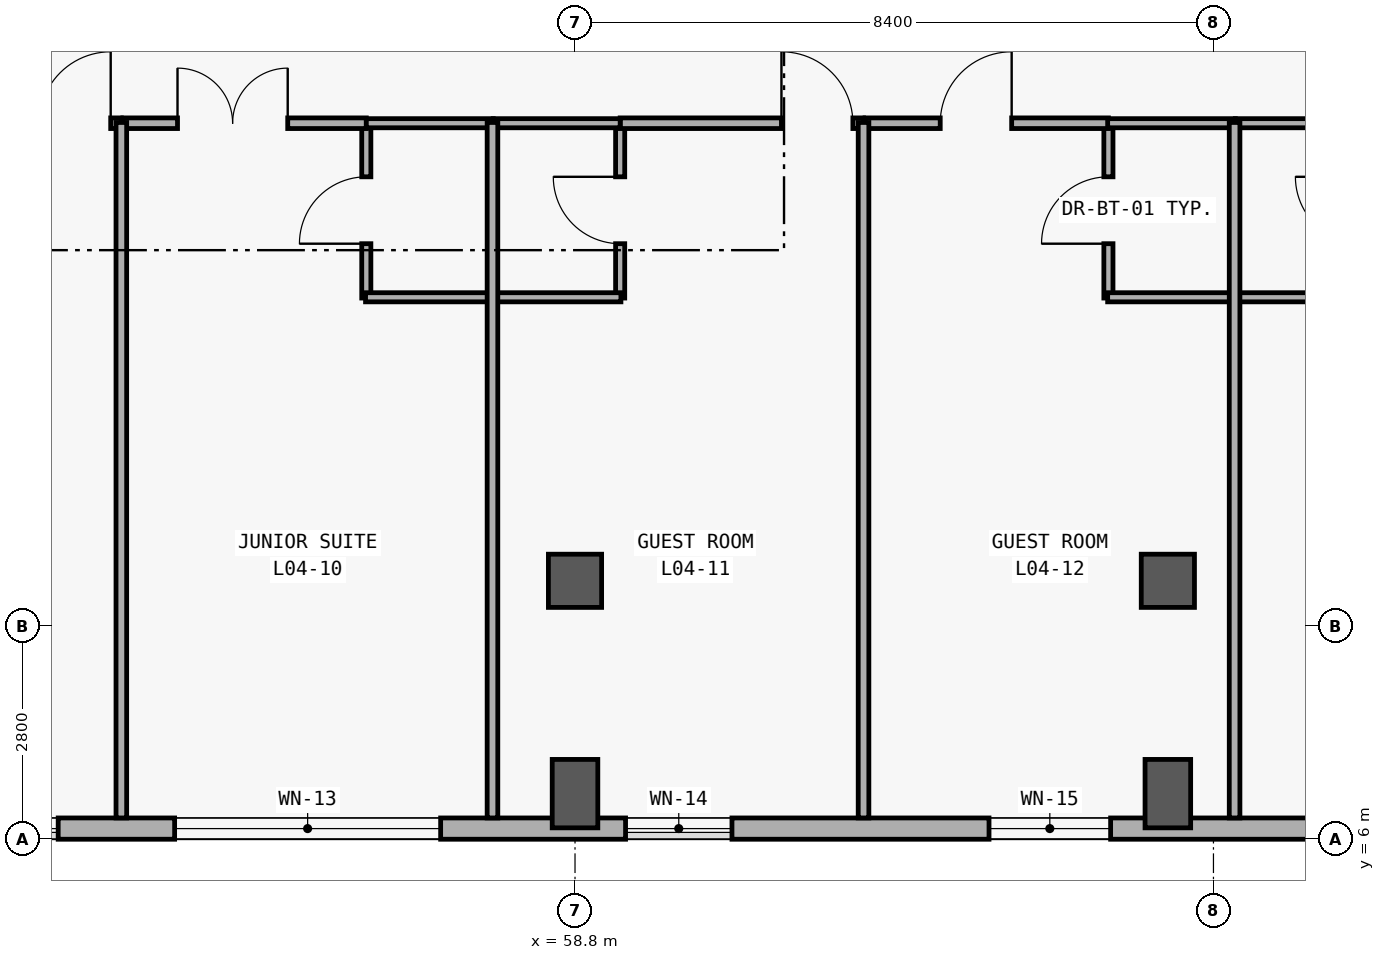
"""IFC4 building model, lengths in metres.
Left out: names, types, materials, properties, quantities, classifications, styles, units other than length and angle.
Written with IfcOpenShell. Run it as: python <this file> out.ifc"""

import sys

from ifc_helpers import new_model, si_unit, direction, frame, frame_2d, origin, origin_2d, place, context, subcontext, project, spatial, rectangle, extrude, element, fill, save


model = new_model("IFC4")
c1 = context("Model", 3, precision=1e-05, world=origin(), true_north=direction((0.0, 1.0)))
c2 = subcontext(c1, "Body", "Model", "MODEL_VIEW")
j1 = project(units=[si_unit("LENGTHUNIT", "METRE"), si_unit("PLANEANGLEUNIT", "RADIAN")], contexts=[c1])
p1 = place(None, origin())
s1 = spatial("IfcSite", under=j1, at=p1, CompositionType="ELEMENT")
p2 = place(p1, origin())
s2 = spatial("IfcBuilding", under=s1, at=p2, CompositionType="ELEMENT")
p3 = place(p2, frame((0.0, 0.0, 19.2)))
s3 = spatial("IfcBuildingStorey", under=s2, at=p3, CompositionType="ELEMENT", Elevation=19.2)
p4 = place(p3, frame((58.8, 6.6, 0.0), z_axis=(0.0, 0.0, 1.0), x_axis=(0.0, 1.0, 0.0)))
e1 = element("IfcColumn", 1, at=p4, inside=s3, PredefinedType="COLUMN", context=c2, shape_type="SweptSolid", body=[
    extrude(rectangle(XDim=0.6, YDim=0.9, at=origin_2d()), origin(), (0.0, 0.0, 1.0), 3.6),
])
p5 = place(p3, frame((58.8, 9.4, 0.0), z_axis=(0.0, 0.0, 1.0), x_axis=(1.0, 0.0, 0.0)))
e2 = element("IfcColumn", 2, at=p5, inside=s3, PredefinedType="COLUMN", context=c2, shape_type="SweptSolid", body=[
    extrude(rectangle(XDim=0.7, YDim=0.7, at=origin_2d()), origin(), (0.0, 0.0, 1.0), 3.6),
])
p6 = place(p3, frame((66.6, 6.6, 0.0), z_axis=(0.0, 0.0, 1.0), x_axis=(0.0, 1.0, 0.0)))
e3 = element("IfcColumn", 3, at=p6, inside=s3, PredefinedType="COLUMN", context=c2, shape_type="SweptSolid", body=[
    extrude(rectangle(XDim=0.6, YDim=0.9, at=origin_2d()), origin(), (0.0, 0.0, 1.0), 3.6),
])
p7 = place(p3, frame((66.6, 9.4, 0.0), z_axis=(0.0, 0.0, 1.0), x_axis=(1.0, 0.0, 0.0)))
e4 = element("IfcColumn", 4, at=p7, inside=s3, PredefinedType="COLUMN", context=c2, shape_type="SweptSolid", body=[
    extrude(rectangle(XDim=0.7, YDim=0.7, at=origin_2d()), origin(), (0.0, 0.0, 1.0), 3.6),
])
p8 = place(p3, frame((92.12, 6.14, 0.0), z_axis=(0.0, 0.0, 1.0), x_axis=(-1.0, 0.0, 0.0)))
e5 = element("IfcWall", 5, at=p8, inside=s3, PredefinedType="SOLIDWALL", context=c2, shape_type="SweptSolid", body=[
    extrude(rectangle(XDim=83.44, YDim=0.28, at=frame_2d((41.72, 0.0))), origin(), (0.0, 0.0, 1.0), 3.32),
])
p9 = place(p8, frame((79.429, 0.0, 0.85)))
e6 = element("IfcOpeningElement", 6, at=p9, cuts=e5, PredefinedType="OPENING", context=c2, shape_type="SweptSolid", body=[
    extrude(rectangle(XDim=2.7, YDim=1.85, at=frame_2d((1.35, 0.925))), frame((0.0, 0.15, 0.0), z_axis=(0.0, -1.0, 0.0), x_axis=(1.0, 0.0, 0.0)), (0.0, 0.0, 1.0), 0.3),
])
p10 = place(p8, frame((74.397, 0.0, 0.85)))
e7 = element("IfcOpeningElement", 7, at=p10, cuts=e5, PredefinedType="OPENING", context=c2, shape_type="SweptSolid", body=[
    extrude(rectangle(XDim=3.0, YDim=1.9, at=frame_2d((1.5, 0.95))), frame((0.0, 0.15, 0.0), z_axis=(0.0, -1.0, 0.0), x_axis=(1.0, 0.0, 0.0)), (0.0, 0.0, 1.0), 0.3),
])
p11 = place(p8, frame((70.264, 0.0, 0.85)))
e8 = element("IfcOpeningElement", 8, at=p11, cuts=e5, PredefinedType="OPENING", context=c2, shape_type="SweptSolid", body=[
    extrude(rectangle(XDim=1.5, YDim=1.75, at=frame_2d((0.75, 0.875))), frame((0.0, 0.15, 0.0), z_axis=(0.0, -1.0, 0.0), x_axis=(1.0, 0.0, 0.0)), (0.0, 0.0, 1.0), 0.3),
])
p12 = place(p8, frame((65.307, 0.0, 0.85)))
e9 = element("IfcOpeningElement", 9, at=p12, cuts=e5, PredefinedType="OPENING", context=c2, shape_type="SweptSolid", body=[
    extrude(rectangle(XDim=1.65, YDim=1.75, at=frame_2d((0.825, 0.875))), frame((0.0, 0.15, 0.0), z_axis=(0.0, -1.0, 0.0), x_axis=(1.0, 0.0, 0.0)), (0.0, 0.0, 1.0), 0.3),
])
p13 = place(p8, frame((60.275, 0.0, 0.85)))
e10 = element("IfcOpeningElement", 10, at=p13, cuts=e5, PredefinedType="OPENING", context=c2, shape_type="SweptSolid", body=[
    extrude(rectangle(XDim=1.95, YDim=1.75, at=frame_2d((0.975, 0.875))), frame((0.0, 0.15, 0.0), z_axis=(0.0, -1.0, 0.0), x_axis=(1.0, 0.0, 0.0)), (0.0, 0.0, 1.0), 0.3),
])
p14 = place(p8, frame((55.242, 0.0, 0.85)))
e11 = element("IfcOpeningElement", 11, at=p14, cuts=e5, PredefinedType="OPENING", context=c2, shape_type="SweptSolid", body=[
    extrude(rectangle(XDim=2.25, YDim=1.75, at=frame_2d((1.125, 0.875))), frame((0.0, 0.15, 0.0), z_axis=(0.0, -1.0, 0.0), x_axis=(1.0, 0.0, 0.0)), (0.0, 0.0, 1.0), 0.3),
])
p15 = place(p8, frame((50.21, 0.0, 0.85)))
e12 = element("IfcOpeningElement", 12, at=p15, cuts=e5, PredefinedType="OPENING", context=c2, shape_type="SweptSolid", body=[
    extrude(rectangle(XDim=2.55, YDim=1.8, at=frame_2d((1.275, 0.9))), frame((0.0, 0.15, 0.0), z_axis=(0.0, -1.0, 0.0), x_axis=(1.0, 0.0, 0.0)), (0.0, 0.0, 1.0), 0.3),
])
p16 = place(p8, frame((45.178, 0.0, 0.85)))
e13 = element("IfcOpeningElement", 13, at=p16, cuts=e5, PredefinedType="OPENING", context=c2, shape_type="SweptSolid", body=[
    extrude(rectangle(XDim=2.85, YDim=1.85, at=frame_2d((1.425, 0.925))), frame((0.0, 0.15, 0.0), z_axis=(0.0, -1.0, 0.0), x_axis=(1.0, 0.0, 0.0)), (0.0, 0.0, 1.0), 0.3),
])
p17 = place(p8, frame((40.12, 0.0, 0.85)))
e14 = element("IfcOpeningElement", 14, at=p17, cuts=e5, PredefinedType="OPENING", context=c2, shape_type="SweptSolid", body=[
    extrude(rectangle(XDim=3.2, YDim=1.95, at=frame_2d((1.6, 0.975))), frame((0.0, 0.15, 0.0), z_axis=(0.0, -1.0, 0.0), x_axis=(1.0, 0.0, 0.0)), (0.0, 0.0, 1.0), 0.3),
])
p18 = place(p8, frame((35.088, 0.0, 0.85)))
e15 = element("IfcOpeningElement", 15, at=p18, cuts=e5, PredefinedType="OPENING", context=c2, shape_type="SweptSolid", body=[
    extrude(rectangle(XDim=3.5, YDim=2.0, at=frame_2d((1.75, 1.0))), frame((0.0, 0.15, 0.0), z_axis=(0.0, -1.0, 0.0), x_axis=(1.0, 0.0, 0.0)), (0.0, 0.0, 1.0), 0.3),
])
p19 = place(p8, frame((31.255, 0.0, 0.85)))
e16 = element("IfcOpeningElement", 16, at=p19, cuts=e5, PredefinedType="OPENING", context=c2, shape_type="SweptSolid", body=[
    extrude(rectangle(XDim=1.4, YDim=1.6, at=frame_2d((0.7, 0.8))), frame((0.0, 0.15, 0.0), z_axis=(0.0, -1.0, 0.0), x_axis=(1.0, 0.0, 0.0)), (0.0, 0.0, 1.0), 0.3),
])
p20 = place(p8, frame((26.273, 0.0, 0.85)))
e17 = element("IfcOpeningElement", 17, at=p20, cuts=e5, PredefinedType="OPENING", context=c2, shape_type="SweptSolid", body=[
    extrude(rectangle(XDim=1.6, YDim=1.6, at=frame_2d((0.8, 0.8))), frame((0.0, 0.15, 0.0), z_axis=(0.0, -1.0, 0.0), x_axis=(1.0, 0.0, 0.0)), (0.0, 0.0, 1.0), 0.3),
])
p21 = place(p8, frame((21.291, 0.0, 0.85)))
e18 = element("IfcOpeningElement", 18, at=p21, cuts=e5, PredefinedType="OPENING", context=c2, shape_type="SweptSolid", body=[
    extrude(rectangle(XDim=1.8, YDim=1.6, at=frame_2d((0.9, 0.8))), frame((0.0, 0.15, 0.0), z_axis=(0.0, -1.0, 0.0), x_axis=(1.0, 0.0, 0.0)), (0.0, 0.0, 1.0), 0.3),
])
p22 = place(p8, frame((16.308, 0.0, 0.85)))
e19 = element("IfcOpeningElement", 19, at=p22, cuts=e5, PredefinedType="OPENING", context=c2, shape_type="SweptSolid", body=[
    extrude(rectangle(XDim=2.0, YDim=1.65, at=frame_2d((1.0, 0.825))), frame((0.0, 0.15, 0.0), z_axis=(0.0, -1.0, 0.0), x_axis=(1.0, 0.0, 0.0)), (0.0, 0.0, 1.0), 0.3),
])
p23 = place(p8, frame((11.326, 0.0, 0.85)))
e20 = element("IfcOpeningElement", 20, at=p23, cuts=e5, PredefinedType="OPENING", context=c2, shape_type="SweptSolid", body=[
    extrude(rectangle(XDim=2.2, YDim=1.65, at=frame_2d((1.1, 0.825))), frame((0.0, 0.15, 0.0), z_axis=(0.0, -1.0, 0.0), x_axis=(1.0, 0.0, 0.0)), (0.0, 0.0, 1.0), 0.3),
])
p24 = place(p8, frame((6.243, 0.0, 0.85)))
e21 = element("IfcOpeningElement", 21, at=p24, cuts=e5, PredefinedType="OPENING", context=c2, shape_type="SweptSolid", body=[
    extrude(rectangle(XDim=2.6, YDim=2.2, at=frame_2d((1.3, 1.1))), frame((0.0, 0.15, 0.0), z_axis=(0.0, -1.0, 0.0), x_axis=(1.0, 0.0, 0.0)), (0.0, 0.0, 1.0), 0.3),
])
p25 = place(p8, frame((1.111, 0.0, 0.85)))
e22 = element("IfcOpeningElement", 22, at=p25, cuts=e5, PredefinedType="OPENING", context=c2, shape_type="SweptSolid", body=[
    extrude(rectangle(XDim=3.1, YDim=2.2, at=frame_2d((1.55, 1.1))), frame((0.0, 0.15, 0.0), z_axis=(0.0, -1.0, 0.0), x_axis=(1.0, 0.0, 0.0)), (0.0, 0.0, 1.0), 0.3),
])
p26 = place(p3, frame((56.054, 13.12, 0.0), z_axis=(0.0, 0.0, 1.0), x_axis=(0.0, 1.0, 0.0)))
e23 = element("IfcWall", 23, at=p26, inside=s3, PredefinedType="PARTITIONING", context=c2, shape_type="SweptSolid", body=[
    extrude(rectangle(XDim=2.31, YDim=0.12, at=frame_2d((1.155, 0.0))), origin(), (0.0, 0.0, 1.0), 2.48),
])
p27 = place(p26, frame((0.715, 0.0, 0.0)))
e24 = element("IfcOpeningElement", 24, at=p27, cuts=e23, PredefinedType="OPENING", context=c2, shape_type="SweptSolid", body=[
    extrude(rectangle(XDim=0.88, YDim=2.15, at=frame_2d((0.44, 1.075))), frame((0.0, 0.07, 0.0), z_axis=(0.0, -1.0, 0.0), x_axis=(1.0, 0.0, 0.0)), (0.0, 0.0, 1.0), 0.14),
])
p28 = place(p3, frame((59.394, 13.12, 0.0), z_axis=(0.0, 0.0, 1.0), x_axis=(0.0, 1.0, 0.0)))
e25 = element("IfcWall", 25, at=p28, inside=s3, PredefinedType="PARTITIONING", context=c2, shape_type="SweptSolid", body=[
    extrude(rectangle(XDim=2.31, YDim=0.12, at=frame_2d((1.155, 0.0))), origin(), (0.0, 0.0, 1.0), 2.48),
])
p29 = place(p28, frame((0.715, 0.0, 0.0)))
e26 = element("IfcOpeningElement", 26, at=p29, cuts=e25, PredefinedType="OPENING", context=c2, shape_type="SweptSolid", body=[
    extrude(rectangle(XDim=0.88, YDim=2.15, at=frame_2d((0.44, 1.075))), frame((0.0, 0.07, 0.0), z_axis=(0.0, -1.0, 0.0), x_axis=(1.0, 0.0, 0.0)), (0.0, 0.0, 1.0), 0.14),
])
p30 = place(p3, frame((65.818, 13.12, 0.0), z_axis=(0.0, 0.0, 1.0), x_axis=(0.0, 1.0, 0.0)))
e27 = element("IfcWall", 27, at=p30, inside=s3, PredefinedType="PARTITIONING", context=c2, shape_type="SweptSolid", body=[
    extrude(rectangle(XDim=2.31, YDim=0.12, at=frame_2d((1.155, 0.0))), origin(), (0.0, 0.0, 1.0), 2.48),
])
p31 = place(p30, frame((0.715, 0.0, 0.0)))
e28 = element("IfcOpeningElement", 28, at=p31, cuts=e27, PredefinedType="OPENING", context=c2, shape_type="SweptSolid", body=[
    extrude(rectangle(XDim=0.88, YDim=2.15, at=frame_2d((0.44, 1.075))), frame((0.0, 0.07, 0.0), z_axis=(0.0, -1.0, 0.0), x_axis=(1.0, 0.0, 0.0)), (0.0, 0.0, 1.0), 0.14),
])
p32 = place(p3, frame((49.629, 15.42, 0.0), z_axis=(0.0, 0.0, 1.0), x_axis=(1.0, 0.0, 0.0)))
e29 = element("IfcWall", 29, at=p32, inside=s3, PredefinedType="PARTITIONING", context=c2, shape_type="SweptSolid", body=[
    extrude(rectangle(XDim=3.202, YDim=0.14, at=frame_2d((1.601, 0.0))), origin(), (0.0, 0.0, 1.0), 2.48),
])
p33 = place(p32, frame((2.122, 0.0, 0.0)))
e30 = element("IfcOpeningElement", 30, at=p33, cuts=e29, PredefinedType="OPENING", context=c2, shape_type="SweptSolid", body=[
    extrude(rectangle(XDim=0.94, YDim=2.2, at=frame_2d((0.47, 1.1))), frame((0.0, 0.08, 0.0), z_axis=(0.0, -1.0, 0.0), x_axis=(1.0, 0.0, 0.0)), (0.0, 0.0, 1.0), 0.16),
])
p34 = place(p3, frame((52.851, 15.42, 0.0), z_axis=(0.0, 0.0, 1.0), x_axis=(1.0, 0.0, 0.0)))
e31 = element("IfcWall", 31, at=p34, inside=s3, PredefinedType="PARTITIONING", context=c2, shape_type="SweptSolid", body=[
    extrude(rectangle(XDim=3.203, YDim=0.14, at=frame_2d((1.602, 0.0))), origin(), (0.0, 0.0, 1.0), 2.48),
])
p35 = place(p34, frame((0.719, 0.0, 0.0)))
e32 = element("IfcOpeningElement", 32, at=p35, cuts=e31, PredefinedType="OPENING", context=c2, shape_type="SweptSolid", body=[
    extrude(rectangle(XDim=1.45, YDim=2.3, at=frame_2d((0.725, 1.15))), frame((0.0, 0.08, 0.0), z_axis=(0.0, -1.0, 0.0), x_axis=(1.0, 0.0, 0.0)), (0.0, 0.0, 1.0), 0.16),
])
p36 = place(p3, frame((59.394, 15.42, 0.0), z_axis=(0.0, 0.0, 1.0), x_axis=(1.0, 0.0, 0.0)))
e33 = element("IfcWall", 33, at=p36, inside=s3, PredefinedType="PARTITIONING", context=c2, shape_type="SweptSolid", body=[
    extrude(rectangle(XDim=3.202, YDim=0.14, at=frame_2d((1.601, 0.0))), origin(), (0.0, 0.0, 1.0), 2.48),
])
p37 = place(p36, frame((2.122, 0.0, 0.0)))
e34 = element("IfcOpeningElement", 34, at=p37, cuts=e33, PredefinedType="OPENING", context=c2, shape_type="SweptSolid", body=[
    extrude(rectangle(XDim=0.94, YDim=2.2, at=frame_2d((0.47, 1.1))), frame((0.0, 0.08, 0.0), z_axis=(0.0, -1.0, 0.0), x_axis=(1.0, 0.0, 0.0)), (0.0, 0.0, 1.0), 0.16),
])
p38 = place(p3, frame((62.616, 15.42, 0.0), z_axis=(0.0, 0.0, 1.0), x_axis=(1.0, 0.0, 0.0)))
e35 = element("IfcWall", 35, at=p38, inside=s3, PredefinedType="PARTITIONING", context=c2, shape_type="SweptSolid", body=[
    extrude(rectangle(XDim=3.202, YDim=0.14, at=frame_2d((1.601, 0.0))), origin(), (0.0, 0.0, 1.0), 2.48),
])
p39 = place(p38, frame((0.989, 0.0, 0.0)))
e36 = element("IfcOpeningElement", 36, at=p39, cuts=e35, PredefinedType="OPENING", context=c2, shape_type="SweptSolid", body=[
    extrude(rectangle(XDim=0.94, YDim=2.2, at=frame_2d((0.47, 1.1))), frame((0.0, 0.08, 0.0), z_axis=(0.0, -1.0, 0.0), x_axis=(1.0, 0.0, 0.0)), (0.0, 0.0, 1.0), 0.16),
])
p40 = place(p3, frame((56.044, 13.13, 0.0), z_axis=(0.0, 0.0, 1.0), x_axis=(1.0, 0.0, 0.0)))
e37 = element("IfcWall", 37, at=p40, inside=s3, PredefinedType="PARTITIONING", context=c2, shape_type="SweptSolid", body=[
    extrude(rectangle(XDim=1.68, YDim=0.12, at=frame_2d((0.84, 0.0))), origin(), (0.0, 0.0, 1.0), 2.48),
])
p41 = place(p3, frame((56.054, 15.42, 0.0), z_axis=(0.0, 0.0, 1.0), x_axis=(1.0, 0.0, 0.0)))
e38 = element("IfcWall", 38, at=p41, inside=s3, PredefinedType="PARTITIONING", context=c2, shape_type="SweptSolid", body=[
    extrude(rectangle(XDim=1.67, YDim=0.12, at=frame_2d((0.835, 0.0))), origin(), (0.0, 0.0, 1.0), 2.48),
])
p42 = place(p3, frame((57.724, 13.13, 0.0), z_axis=(0.0, 0.0, 1.0), x_axis=(1.0, 0.0, 0.0)))
e39 = element("IfcWall", 39, at=p42, inside=s3, PredefinedType="PARTITIONING", context=c2, shape_type="SweptSolid", body=[
    extrude(rectangle(XDim=1.68, YDim=0.12, at=frame_2d((0.84, 0.0))), origin(), (0.0, 0.0, 1.0), 2.48),
])
p43 = place(p3, frame((57.724, 15.42, 0.0), z_axis=(0.0, 0.0, 1.0), x_axis=(1.0, 0.0, 0.0)))
e40 = element("IfcWall", 40, at=p43, inside=s3, PredefinedType="PARTITIONING", context=c2, shape_type="SweptSolid", body=[
    extrude(rectangle(XDim=1.67, YDim=0.12, at=frame_2d((0.835, 0.0))), origin(), (0.0, 0.0, 1.0), 2.48),
])
for number, where, z_axis, x_axis in (
    (41, (65.808, 13.13, 0.0), (0.0, 0.0, 1.0), (1.0, 0.0, 0.0)),
    (42, (65.808, 15.42, 0.0), (0.0, 0.0, 1.0), (1.0, 0.0, 0.0)),
    (43, (67.488, 13.13, 0.0), (0.0, 0.0, 1.0), (1.0, 0.0, 0.0)),
    (44, (67.488, 15.42, 0.0), (0.0, 0.0, 1.0), (1.0, 0.0, 0.0)),
):
    element("IfcWall", number, at=place(p3, frame(where, z_axis=z_axis, x_axis=x_axis)), inside=s3, PredefinedType="PARTITIONING", context=c2, shape_type="SweptSolid", body=[
        extrude(rectangle(XDim=1.68, YDim=0.12, at=frame_2d((0.84, 0.0))), origin(), (0.0, 0.0, 1.0), 2.48),
    ])
for number, where, z_axis, x_axis in (
    (45, (52.831, 6.28, 0.0), (0.0, 0.0, 1.0), (0.0, 1.0, 0.0)),
    (46, (57.714, 6.28, 0.0), (0.0, 0.0, 1.0), (0.0, 1.0, 0.0)),
    (47, (62.596, 6.28, 0.0), (0.0, 0.0, 1.0), (0.0, 1.0, 0.0)),
    (48, (67.478, 6.28, 0.0), (0.0, 0.0, 1.0), (0.0, 1.0, 0.0)),
):
    element("IfcWall", number, at=place(p3, frame(where, z_axis=z_axis, x_axis=x_axis)), inside=s3, PredefinedType="PARTITIONING", context=c2, shape_type="SweptSolid", body=[
        extrude(rectangle(XDim=9.15, YDim=0.14, at=frame_2d((4.575, 0.0))), origin(), (0.0, 0.0, 1.0), 2.48),
    ])
p44 = place(p17, origin())
e49 = element("IfcWindow", 49, at=p44, inside=s3, PartitioningType="SINGLE_PANEL", PredefinedType="WINDOW", context=c2, shape_type="SweptSolid", body=[
    extrude(rectangle(XDim=3.2, YDim=1.95, at=frame_2d((1.6, 0.975))), frame((0.0, 0.03, 0.0), z_axis=(0.0, -1.0, 0.0), x_axis=(1.0, 0.0, 0.0)), (0.0, 0.0, 1.0), 0.06),
])
fill(e14, e49)
p45 = place(p18, origin())
e50 = element("IfcWindow", 50, at=p45, inside=s3, PartitioningType="SINGLE_PANEL", PredefinedType="WINDOW", context=c2, shape_type="SweptSolid", body=[
    extrude(rectangle(XDim=3.5, YDim=2.0, at=frame_2d((1.75, 1.0))), frame((0.0, 0.03, 0.0), z_axis=(0.0, -1.0, 0.0), x_axis=(1.0, 0.0, 0.0)), (0.0, 0.0, 1.0), 0.06),
])
fill(e15, e50)
p46 = place(p19, origin())
e51 = element("IfcWindow", 51, at=p46, inside=s3, PartitioningType="SINGLE_PANEL", PredefinedType="WINDOW", context=c2, shape_type="SweptSolid", body=[
    extrude(rectangle(XDim=1.4, YDim=1.6, at=frame_2d((0.7, 0.8))), frame((0.0, 0.03, 0.0), z_axis=(0.0, -1.0, 0.0), x_axis=(1.0, 0.0, 0.0)), (0.0, 0.0, 1.0), 0.06),
])
fill(e16, e51)
p47 = place(p20, origin())
e52 = element("IfcWindow", 52, at=p47, inside=s3, PartitioningType="SINGLE_PANEL", PredefinedType="WINDOW", context=c2, shape_type="SweptSolid", body=[
    extrude(rectangle(XDim=1.6, YDim=1.6, at=frame_2d((0.8, 0.8))), frame((0.0, 0.03, 0.0), z_axis=(0.0, -1.0, 0.0), x_axis=(1.0, 0.0, 0.0)), (0.0, 0.0, 1.0), 0.06),
])
fill(e17, e52)
p48 = place(p27, origin())
e53 = element("IfcDoor", 53, at=p48, inside=s3, OperationType="SINGLE_SWING_LEFT", PredefinedType="DOOR", context=c2, shape_type="SweptSolid", body=[
    extrude(rectangle(XDim=0.88, YDim=2.15, at=frame_2d((0.44, 1.075))), frame((0.0, 0.025, 0.0), z_axis=(0.0, -1.0, 0.0), x_axis=(1.0, 0.0, 0.0)), (0.0, 0.0, 1.0), 0.05),
])
fill(e24, e53)
p49 = place(p29, origin())
e54 = element("IfcDoor", 54, at=p49, inside=s3, OperationType="SINGLE_SWING_RIGHT", PredefinedType="DOOR", context=c2, shape_type="SweptSolid", body=[
    extrude(rectangle(XDim=0.88, YDim=2.15, at=frame_2d((0.44, 1.075))), frame((0.0, 0.025, 0.0), z_axis=(0.0, -1.0, 0.0), x_axis=(1.0, 0.0, 0.0)), (0.0, 0.0, 1.0), 0.05),
])
fill(e26, e54)
p50 = place(p31, origin())
e55 = element("IfcDoor", 55, at=p50, inside=s3, OperationType="SINGLE_SWING_LEFT", PredefinedType="DOOR", context=c2, shape_type="SweptSolid", body=[
    extrude(rectangle(XDim=0.88, YDim=2.15, at=frame_2d((0.44, 1.075))), frame((0.0, 0.025, 0.0), z_axis=(0.0, -1.0, 0.0), x_axis=(1.0, 0.0, 0.0)), (0.0, 0.0, 1.0), 0.05),
])
fill(e28, e55)
p51 = place(p33, origin())
e56 = element("IfcDoor", 56, at=p51, inside=s3, OperationType="SINGLE_SWING_RIGHT", PredefinedType="DOOR", context=c2, shape_type="SweptSolid", body=[
    extrude(rectangle(XDim=0.94, YDim=2.2, at=frame_2d((0.47, 1.1))), frame((0.0, 0.025, 0.0), z_axis=(0.0, -1.0, 0.0), x_axis=(1.0, 0.0, 0.0)), (0.0, 0.0, 1.0), 0.05),
])
fill(e30, e56)
p52 = place(p35, origin())
e57 = element("IfcDoor", 57, at=p52, inside=s3, OperationType="DOUBLE_DOOR_SINGLE_SWING", PredefinedType="DOOR", context=c2, shape_type="SweptSolid", body=[
    extrude(rectangle(XDim=1.45, YDim=2.3, at=frame_2d((0.725, 1.15))), frame((0.0, 0.025, 0.0), z_axis=(0.0, -1.0, 0.0), x_axis=(1.0, 0.0, 0.0)), (0.0, 0.0, 1.0), 0.05),
])
fill(e32, e57)
p53 = place(p37, origin())
e58 = element("IfcDoor", 58, at=p53, inside=s3, OperationType="SINGLE_SWING_LEFT", PredefinedType="DOOR", context=c2, shape_type="SweptSolid", body=[
    extrude(rectangle(XDim=0.94, YDim=2.2, at=frame_2d((0.47, 1.1))), frame((0.0, 0.025, 0.0), z_axis=(0.0, -1.0, 0.0), x_axis=(1.0, 0.0, 0.0)), (0.0, 0.0, 1.0), 0.05),
])
fill(e34, e58)
p54 = place(p39, origin())
e59 = element("IfcDoor", 59, at=p54, inside=s3, OperationType="SINGLE_SWING_RIGHT", PredefinedType="DOOR", context=c2, shape_type="SweptSolid", body=[
    extrude(rectangle(XDim=0.94, YDim=2.2, at=frame_2d((0.47, 1.1))), frame((0.0, 0.025, 0.0), z_axis=(0.0, -1.0, 0.0), x_axis=(1.0, 0.0, 0.0)), (0.0, 0.0, 1.0), 0.05),
])
fill(e36, e59)
save(model, sys.argv[1])
